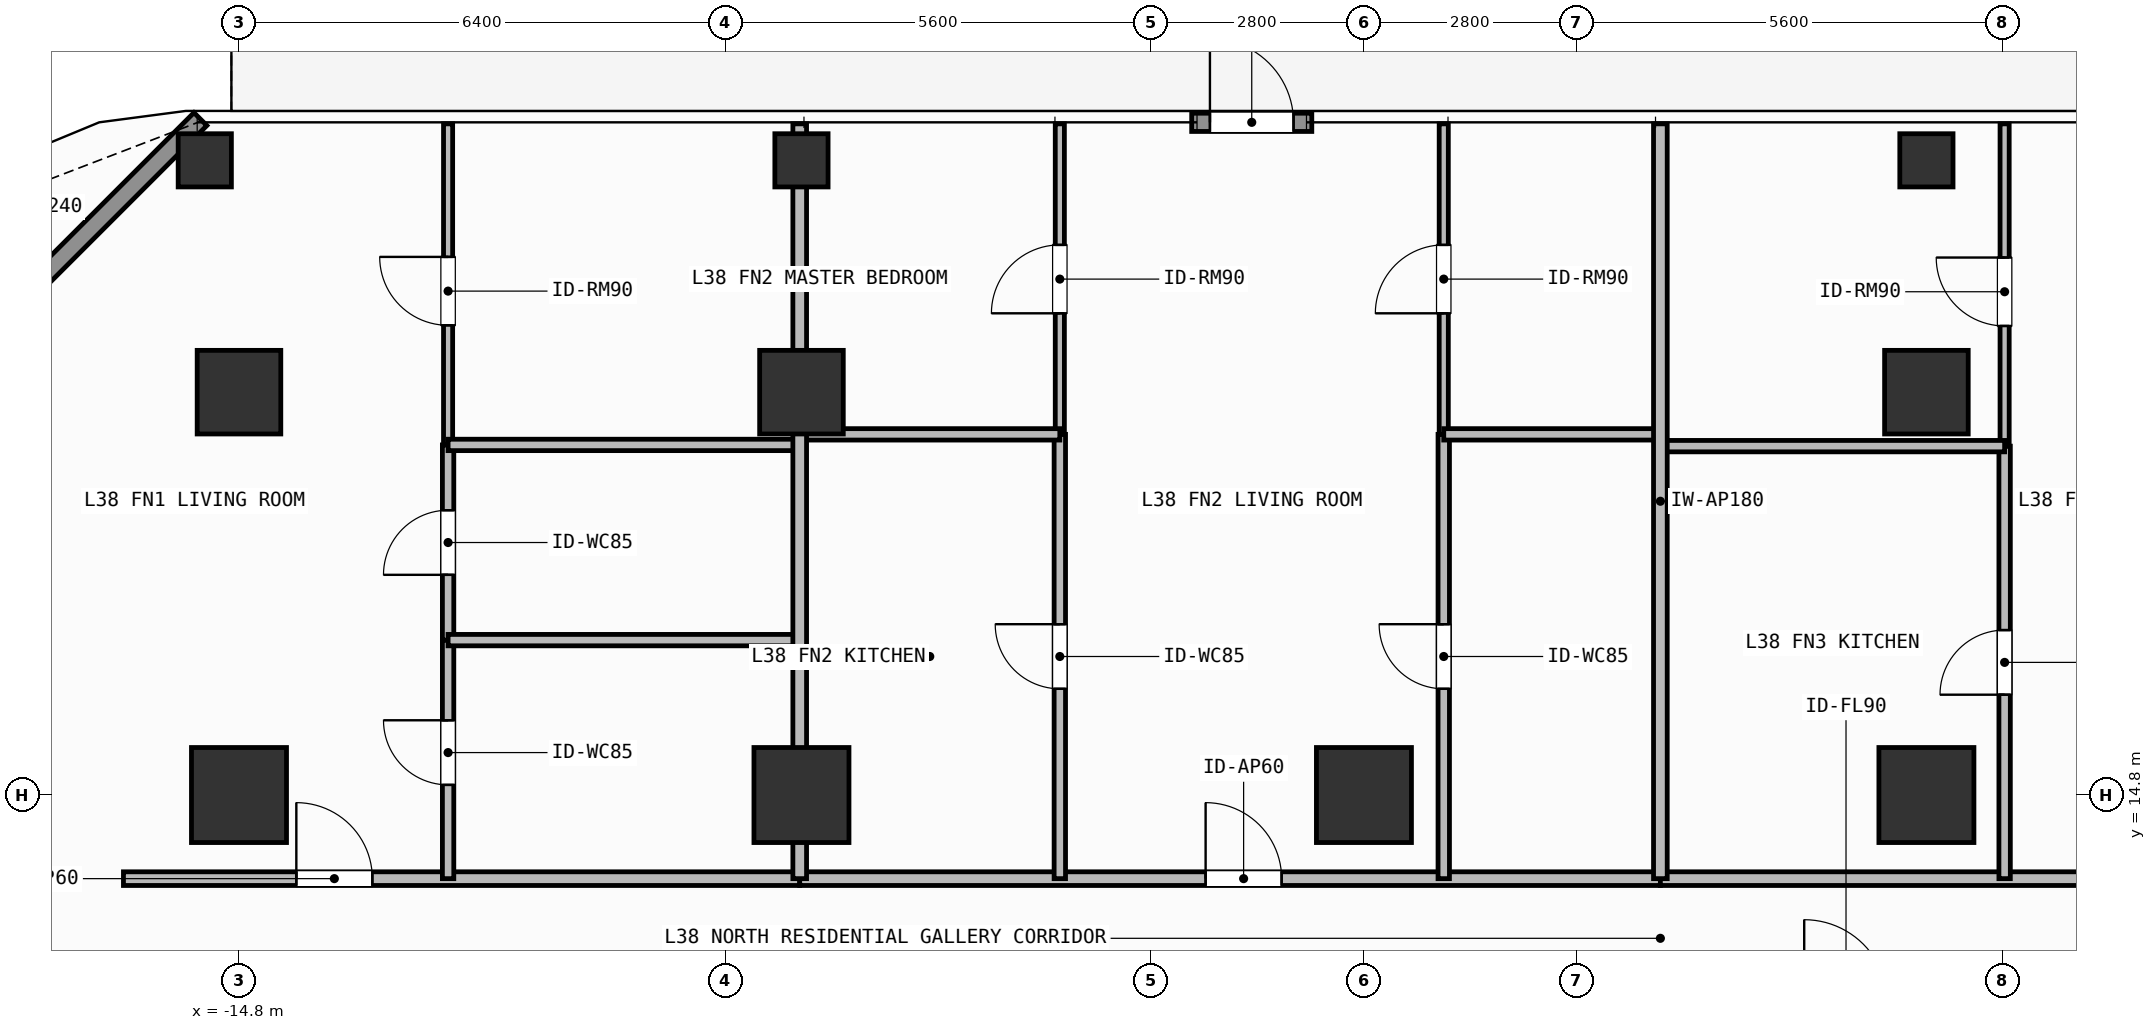
"""IFC4 building model, lengths in metres.
Left out: names, types, materials, properties, quantities, classifications, styles, units other than length and angle.
Written with IfcOpenShell. Run it as: python <this file> out.ifc"""

import sys

from ifc_helpers import new_model, si_unit, direction, frame, frame_2d, origin, origin_2d, place, context, subcontext, project, spatial, rectangle, hollow_rectangle, extrude, element, fill, save


model = new_model("IFC4")
c1 = context("Model", 3, precision=1e-05, world=origin(), true_north=direction((0.0, 1.0)))
c2 = subcontext(c1, "Body", "Model", "MODEL_VIEW")
j1 = project(units=[si_unit("LENGTHUNIT", "METRE"), si_unit("PLANEANGLEUNIT", "RADIAN")], contexts=[c1])
p1 = place(None, origin())
s1 = spatial("IfcSite", under=j1, at=p1, CompositionType="ELEMENT")
p2 = place(p1, origin())
s2 = spatial("IfcBuilding", under=s1, at=p2, CompositionType="ELEMENT")
p3 = place(p2, frame((0.0, 0.0, 152.4)))
s3 = spatial("IfcBuildingStorey", under=s2, at=p3, CompositionType="ELEMENT", Elevation=152.4)
for number, where, z_axis, x_axis in (
    (1, (-14.8, 14.8, 0.0), (0.0, 0.0, 1.0), (1.0, 0.0, 0.0)),
    (2, (-7.4, 14.8, 0.0), (0.0, 0.0, 1.0), (1.0, 0.0, 0.0)),
    (3, (0.0, 14.8, 0.0), (0.0, 0.0, 1.0), (1.0, 0.0, 0.0)),
    (4, (7.4, 14.8, 0.0), (0.0, 0.0, 1.0), (1.0, 0.0, 0.0)),
):
    element("IfcColumn", number, at=place(p3, frame(where, z_axis=z_axis, x_axis=x_axis)), inside=s3, PredefinedType="COLUMN", context=c2, shape_type="SweptSolid", body=[
        extrude(rectangle(XDim=1.25, YDim=1.25, at=origin_2d()), origin(), (0.0, 0.0, 1.0), 3.9),
    ])
for number, where, z_axis, x_axis in (
    (5, (-14.8, 20.1, 0.0), (0.0, 0.0, 1.0), (1.0, 0.0, 0.0)),
    (6, (-7.4, 20.1, 0.0), (0.0, 0.0, 1.0), (1.0, 0.0, 0.0)),
    (7, (7.4, 20.1, 0.0), (0.0, 0.0, 1.0), (1.0, 0.0, 0.0)),
):
    element("IfcColumn", number, at=place(p3, frame(where, z_axis=z_axis, x_axis=x_axis)), inside=s3, PredefinedType="COLUMN", context=c2, shape_type="SweptSolid", body=[
        extrude(rectangle(XDim=1.1, YDim=1.1, at=origin_2d()), origin(), (0.0, 0.0, 1.0), 3.9),
    ])
for number, where, z_axis, x_axis in (
    (8, (-15.25, 23.15, 0.0), (0.0, 0.0, 1.0), (1.0, 0.0, 0.0)),
    (9, (-7.4, 23.15, 0.0), (0.0, 0.0, 1.0), (1.0, 0.0, 0.0)),
    (10, (7.4, 23.15, 0.0), (0.0, 0.0, 1.0), (1.0, 0.0, 0.0)),
):
    element("IfcColumn", number, at=place(p3, frame(where, z_axis=z_axis, x_axis=x_axis)), inside=s3, PredefinedType="COLUMN", context=c2, shape_type="SweptSolid", body=[
        extrude(hollow_rectangle(XDim=0.7, YDim=0.7, WallThickness=0.032, at=origin_2d()), origin(), (0.0, 0.0, 1.0), 3.9),
    ])
p4 = place(p3, frame((-2.266, 23.65, 0.0), z_axis=(0.0, 0.0, 1.0), x_axis=(1.0, 0.0, 0.0)))
e11 = element("IfcWall", 11, at=p4, inside=s3, PredefinedType="SOLIDWALL", context=c2, shape_type="SweptSolid", body=[
    extrude(rectangle(XDim=1.58, YDim=0.24, at=frame_2d((0.79, 0.0))), origin(), (0.0, 0.0, 1.0), 3.6),
])
p5 = place(p4, frame((0.24, 0.0, 0.0)))
e12 = element("IfcOpeningElement", 12, at=p5, cuts=e11, PredefinedType="OPENING", context=c2, shape_type="SweptSolid", body=[
    extrude(rectangle(XDim=1.1, YDim=2.2, at=frame_2d((0.55, 1.1))), frame((0.0, 0.13, 0.0), z_axis=(0.0, -1.0, 0.0), x_axis=(1.0, 0.0, 0.0)), (0.0, 0.0, 1.0), 0.26),
])
p6 = place(p3, frame((-19.792, 19.208, 0.0), z_axis=(0.0, 0.0, 1.0), x_axis=(0.707106781187, 0.707106781187, 0.0)))
e13 = element("IfcWall", 13, at=p6, inside=s3, PredefinedType="SOLIDWALL", context=c2, shape_type="SweptSolid", body=[
    extrude(rectangle(XDim=6.343, YDim=0.24, at=frame_2d((3.171, 0.0))), origin(), (0.0, 0.0, 1.0), 3.6),
])
p7 = place(p3, frame((-16.32, 13.7, 0.0), z_axis=(0.0, 0.0, 1.0), x_axis=(1.0, 0.0, 0.0)))
e14 = element("IfcWall", 14, at=p7, inside=s3, PredefinedType="PARTITIONING", context=c2, shape_type="SweptSolid", body=[
    extrude(rectangle(XDim=8.897, YDim=0.18, at=frame_2d((4.448, 0.0))), origin(), (0.0, 0.0, 1.0), 3.6),
])
p8 = place(p7, frame((2.274, 0.0, 0.0)))
e15 = element("IfcOpeningElement", 15, at=p8, cuts=e14, PredefinedType="OPENING", context=c2, shape_type="SweptSolid", body=[
    extrude(rectangle(XDim=1.0, YDim=2.2, at=frame_2d((0.5, 1.1))), frame((0.0, 0.1, 0.0), z_axis=(0.0, -1.0, 0.0), x_axis=(1.0, 0.0, 0.0)), (0.0, 0.0, 1.0), 0.2),
])
p9 = place(p3, frame((-12.049, 13.7, 0.0), z_axis=(0.0, 0.0, 1.0), x_axis=(0.0, 1.0, 0.0)))
e16 = element("IfcWall", 16, at=p9, inside=s3, PredefinedType="PARTITIONING", context=c2, shape_type="SweptSolid", body=[
    extrude(rectangle(XDim=3.138, YDim=0.15, at=frame_2d((1.569, 0.0))), origin(), (0.0, 0.0, 1.0), 3.6),
])
p10 = place(p9, frame((1.233, 0.0, 0.0)))
e17 = element("IfcOpeningElement", 17, at=p10, cuts=e16, PredefinedType="OPENING", context=c2, shape_type="SweptSolid", body=[
    extrude(rectangle(XDim=0.85, YDim=2.1, at=frame_2d((0.425, 1.05))), frame((0.0, 0.085, 0.0), z_axis=(0.0, -1.0, 0.0), x_axis=(1.0, 0.0, 0.0)), (0.0, 0.0, 1.0), 0.17),
])
p11 = place(p3, frame((-12.049, 16.838, 0.0), z_axis=(0.0, 0.0, 1.0), x_axis=(0.0, 1.0, 0.0)))
e18 = element("IfcWall", 18, at=p11, inside=s3, PredefinedType="PARTITIONING", context=c2, shape_type="SweptSolid", body=[
    extrude(rectangle(XDim=2.568, YDim=0.15, at=frame_2d((1.284, 0.0))), origin(), (0.0, 0.0, 1.0), 3.6),
])
p12 = place(p11, frame((0.859, 0.0, 0.0)))
e19 = element("IfcOpeningElement", 19, at=p12, cuts=e18, PredefinedType="OPENING", context=c2, shape_type="SweptSolid", body=[
    extrude(rectangle(XDim=0.85, YDim=2.1, at=frame_2d((0.425, 1.05))), frame((0.0, 0.085, 0.0), z_axis=(0.0, -1.0, 0.0), x_axis=(1.0, 0.0, 0.0)), (0.0, 0.0, 1.0), 0.17),
])
p13 = place(p3, frame((-12.049, 19.406, 0.0), z_axis=(0.0, 0.0, 1.0), x_axis=(0.0, 1.0, 0.0)))
e20 = element("IfcWall", 20, at=p13, inside=s3, PredefinedType="PARTITIONING", context=c2, shape_type="SweptSolid", body=[
    extrude(rectangle(XDim=4.224, YDim=0.12, at=frame_2d((2.112, 0.0))), origin(), (0.0, 0.0, 1.0), 3.6),
])
p14 = place(p13, frame((1.573, 0.0, 0.0)))
e21 = element("IfcOpeningElement", 21, at=p14, cuts=e20, PredefinedType="OPENING", context=c2, shape_type="SweptSolid", body=[
    extrude(rectangle(XDim=0.9, YDim=2.1, at=frame_2d((0.45, 1.05))), frame((0.0, 0.07, 0.0), z_axis=(0.0, -1.0, 0.0), x_axis=(1.0, 0.0, 0.0)), (0.0, 0.0, 1.0), 0.14),
])
p15 = place(p3, frame((-7.423, 13.7, 0.0), z_axis=(0.0, 0.0, 1.0), x_axis=(1.0, 0.0, 0.0)))
e22 = element("IfcWall", 22, at=p15, inside=s3, PredefinedType="PARTITIONING", context=c2, shape_type="SweptSolid", body=[
    extrude(rectangle(XDim=11.323, YDim=0.18, at=frame_2d((5.662, 0.0))), origin(), (0.0, 0.0, 1.0), 3.6),
])
p16 = place(p15, frame((5.34, 0.0, 0.0)))
e23 = element("IfcOpeningElement", 23, at=p16, cuts=e22, PredefinedType="OPENING", context=c2, shape_type="SweptSolid", body=[
    extrude(rectangle(XDim=1.0, YDim=2.2, at=frame_2d((0.5, 1.1))), frame((0.0, 0.1, 0.0), z_axis=(0.0, -1.0, 0.0), x_axis=(1.0, 0.0, 0.0)), (0.0, 0.0, 1.0), 0.2),
])
p17 = place(p3, frame((-4.001, 13.7, 0.0), z_axis=(0.0, 0.0, 1.0), x_axis=(0.0, 1.0, 0.0)))
e24 = element("IfcWall", 24, at=p17, inside=s3, PredefinedType="PARTITIONING", context=c2, shape_type="SweptSolid", body=[
    extrude(rectangle(XDim=5.845, YDim=0.15, at=frame_2d((2.922, 0.0))), origin(), (0.0, 0.0, 1.0), 3.6),
])
p18 = place(p17, frame((2.498, 0.0, 0.0)))
e25 = element("IfcOpeningElement", 25, at=p18, cuts=e24, PredefinedType="OPENING", context=c2, shape_type="SweptSolid", body=[
    extrude(rectangle(XDim=0.85, YDim=2.1, at=frame_2d((0.425, 1.05))), frame((0.0, 0.085, 0.0), z_axis=(0.0, -1.0, 0.0), x_axis=(1.0, 0.0, 0.0)), (0.0, 0.0, 1.0), 0.17),
])
p19 = place(p3, frame((-4.001, 19.545, 0.0), z_axis=(0.0, 0.0, 1.0), x_axis=(0.0, 1.0, 0.0)))
e26 = element("IfcWall", 26, at=p19, inside=s3, PredefinedType="PARTITIONING", context=c2, shape_type="SweptSolid", body=[
    extrude(rectangle(XDim=4.085, YDim=0.12, at=frame_2d((2.042, 0.0))), origin(), (0.0, 0.0, 1.0), 3.6),
])
p20 = place(p19, frame((1.593, 0.0, 0.0)))
e27 = element("IfcOpeningElement", 27, at=p20, cuts=e26, PredefinedType="OPENING", context=c2, shape_type="SweptSolid", body=[
    extrude(rectangle(XDim=0.9, YDim=2.1, at=frame_2d((0.45, 1.05))), frame((0.0, 0.07, 0.0), z_axis=(0.0, -1.0, 0.0), x_axis=(1.0, 0.0, 0.0)), (0.0, 0.0, 1.0), 0.14),
])
p21 = place(p3, frame((1.05, 13.7, 0.0), z_axis=(0.0, 0.0, 1.0), x_axis=(0.0, 1.0, 0.0)))
e28 = element("IfcWall", 28, at=p21, inside=s3, PredefinedType="PARTITIONING", context=c2, shape_type="SweptSolid", body=[
    extrude(rectangle(XDim=5.845, YDim=0.15, at=frame_2d((2.922, 0.0))), origin(), (0.0, 0.0, 1.0), 3.6),
])
p22 = place(p21, frame((2.498, 0.0, 0.0)))
e29 = element("IfcOpeningElement", 29, at=p22, cuts=e28, PredefinedType="OPENING", context=c2, shape_type="SweptSolid", body=[
    extrude(rectangle(XDim=0.85, YDim=2.1, at=frame_2d((0.425, 1.05))), frame((0.0, 0.085, 0.0), z_axis=(0.0, -1.0, 0.0), x_axis=(1.0, 0.0, 0.0)), (0.0, 0.0, 1.0), 0.17),
])
p23 = place(p3, frame((1.05, 19.545, 0.0), z_axis=(0.0, 0.0, 1.0), x_axis=(0.0, 1.0, 0.0)))
e30 = element("IfcWall", 30, at=p23, inside=s3, PredefinedType="PARTITIONING", context=c2, shape_type="SweptSolid", body=[
    extrude(rectangle(XDim=4.085, YDim=0.12, at=frame_2d((2.042, 0.0))), origin(), (0.0, 0.0, 1.0), 3.6),
])
p24 = place(p23, frame((1.593, 0.0, 0.0)))
e31 = element("IfcOpeningElement", 31, at=p24, cuts=e30, PredefinedType="OPENING", context=c2, shape_type="SweptSolid", body=[
    extrude(rectangle(XDim=0.9, YDim=2.1, at=frame_2d((0.45, 1.05))), frame((0.0, 0.07, 0.0), z_axis=(0.0, -1.0, 0.0), x_axis=(1.0, 0.0, 0.0)), (0.0, 0.0, 1.0), 0.14),
])
p25 = place(p3, frame((3.9, 13.7, 0.0), z_axis=(0.0, 0.0, 1.0), x_axis=(1.0, 0.0, 0.0)))
e32 = element("IfcWall", 32, at=p25, inside=s3, PredefinedType="PARTITIONING", context=c2, shape_type="SweptSolid", body=[
    extrude(rectangle(XDim=11.323, YDim=0.18, at=frame_2d((5.662, 0.0))), origin(), (0.0, 0.0, 1.0), 3.6),
])
p26 = place(p25, frame((5.519, 0.0, 0.0)))
e33 = element("IfcOpeningElement", 33, at=p26, cuts=e32, PredefinedType="OPENING", context=c2, shape_type="SweptSolid", body=[
    extrude(rectangle(XDim=1.0, YDim=2.2, at=frame_2d((0.5, 1.1))), frame((0.0, 0.1, 0.0), z_axis=(0.0, -1.0, 0.0), x_axis=(1.0, 0.0, 0.0)), (0.0, 0.0, 1.0), 0.2),
])
p27 = place(p3, frame((8.429, 13.7, 0.0), z_axis=(0.0, 0.0, 1.0), x_axis=(0.0, 1.0, 0.0)))
e34 = element("IfcWall", 34, at=p27, inside=s3, PredefinedType="PARTITIONING", context=c2, shape_type="SweptSolid", body=[
    extrude(rectangle(XDim=5.69, YDim=0.15, at=frame_2d((2.845, 0.0))), origin(), (0.0, 0.0, 1.0), 3.6),
])
p28 = place(p27, frame((2.42, 0.0, 0.0)))
e35 = element("IfcOpeningElement", 35, at=p28, cuts=e34, PredefinedType="OPENING", context=c2, shape_type="SweptSolid", body=[
    extrude(rectangle(XDim=0.85, YDim=2.1, at=frame_2d((0.425, 1.05))), frame((0.0, 0.085, 0.0), z_axis=(0.0, -1.0, 0.0), x_axis=(1.0, 0.0, 0.0)), (0.0, 0.0, 1.0), 0.17),
])
p29 = place(p3, frame((8.429, 19.39, 0.0), z_axis=(0.0, 0.0, 1.0), x_axis=(0.0, 1.0, 0.0)))
e36 = element("IfcWall", 36, at=p29, inside=s3, PredefinedType="PARTITIONING", context=c2, shape_type="SweptSolid", body=[
    extrude(rectangle(XDim=4.24, YDim=0.12, at=frame_2d((2.12, 0.0))), origin(), (0.0, 0.0, 1.0), 3.6),
])
p30 = place(p29, frame((1.581, 0.0, 0.0)))
e37 = element("IfcOpeningElement", 37, at=p30, cuts=e36, PredefinedType="OPENING", context=c2, shape_type="SweptSolid", body=[
    extrude(rectangle(XDim=0.9, YDim=2.1, at=frame_2d((0.45, 1.05))), frame((0.0, 0.07, 0.0), z_axis=(0.0, -1.0, 0.0), x_axis=(1.0, 0.0, 0.0)), (0.0, 0.0, 1.0), 0.14),
])
for number, where, z_axis, x_axis in (
    (38, (-12.049, 16.838, 0.0), (0.0, 0.0, 1.0), (1.0, 0.0, 0.0)),
    (39, (-12.049, 19.406, 0.0), (0.0, 0.0, 1.0), (1.0, 0.0, 0.0)),
):
    element("IfcWall", number, at=place(p3, frame(where, z_axis=z_axis, x_axis=x_axis)), inside=s3, PredefinedType="PARTITIONING", context=c2, shape_type="SweptSolid", body=[
        extrude(rectangle(XDim=4.626, YDim=0.15, at=frame_2d((2.313, 0.0))), origin(), (0.0, 0.0, 1.0), 3.6),
    ])
p31 = place(p3, frame((-7.423, 19.545, 0.0), z_axis=(0.0, 0.0, 1.0), x_axis=(1.0, 0.0, 0.0)))
e40 = element("IfcWall", 40, at=p31, inside=s3, PredefinedType="PARTITIONING", context=c2, shape_type="SweptSolid", body=[
    extrude(rectangle(XDim=3.422, YDim=0.15, at=frame_2d((1.711, 0.0))), origin(), (0.0, 0.0, 1.0), 3.6),
])
p32 = place(p3, frame((1.05, 19.545, 0.0), z_axis=(0.0, 0.0, 1.0), x_axis=(1.0, 0.0, 0.0)))
e41 = element("IfcWall", 41, at=p32, inside=s3, PredefinedType="PARTITIONING", context=c2, shape_type="SweptSolid", body=[
    extrude(rectangle(XDim=2.85, YDim=0.15, at=frame_2d((1.425, 0.0))), origin(), (0.0, 0.0, 1.0), 3.6),
])
p33 = place(p3, frame((-7.423, 13.7, 0.0), z_axis=(0.0, 0.0, 1.0), x_axis=(0.0, 1.0, 0.0)))
e42 = element("IfcWall", 42, at=p33, inside=s3, PredefinedType="PARTITIONING", context=c2, shape_type="SweptSolid", body=[
    extrude(rectangle(XDim=9.93, YDim=0.18, at=frame_2d((4.965, 0.0))), origin(), (0.0, 0.0, 1.0), 3.002),
])
p34 = place(p3, frame((3.9, 19.39, 0.0), z_axis=(0.0, 0.0, 1.0), x_axis=(1.0, 0.0, 0.0)))
e43 = element("IfcWall", 43, at=p34, inside=s3, PredefinedType="PARTITIONING", context=c2, shape_type="SweptSolid", body=[
    extrude(rectangle(XDim=4.529, YDim=0.15, at=frame_2d((2.265, 0.0))), origin(), (0.0, 0.0, 1.0), 3.6),
])
p35 = place(p3, frame((3.9, 13.7, 0.0), z_axis=(0.0, 0.0, 1.0), x_axis=(0.0, 1.0, 0.0)))
e44 = element("IfcWall", 44, at=p35, inside=s3, PredefinedType="PARTITIONING", context=c2, shape_type="SweptSolid", body=[
    extrude(rectangle(XDim=9.93, YDim=0.18, at=frame_2d((4.965, 0.0))), origin(), (0.0, 0.0, 1.0), 3.6),
])
p36 = place(p5, origin())
e45 = element("IfcDoor", 45, at=p36, inside=s3, OperationType="SINGLE_SWING_LEFT", PredefinedType="DOOR", context=c2, shape_type="SweptSolid", body=[
    extrude(rectangle(XDim=1.1, YDim=2.2, at=frame_2d((0.55, 1.1))), frame((0.0, 0.025, 0.0), z_axis=(0.0, -1.0, 0.0), x_axis=(1.0, 0.0, 0.0)), (0.0, 0.0, 1.0), 0.05),
])
fill(e12, e45)
p37 = place(p8, origin())
e46 = element("IfcDoor", 46, at=p37, inside=s3, OperationType="SINGLE_SWING_LEFT", PredefinedType="DOOR", context=c2, shape_type="SweptSolid", body=[
    extrude(rectangle(XDim=1.0, YDim=2.2, at=frame_2d((0.5, 1.1))), frame((0.0, 0.025, 0.0), z_axis=(0.0, -1.0, 0.0), x_axis=(1.0, 0.0, 0.0)), (0.0, 0.0, 1.0), 0.05),
])
fill(e15, e46)
p38 = place(p10, origin())
e47 = element("IfcDoor", 47, at=p38, inside=s3, OperationType="SINGLE_SWING_RIGHT", PredefinedType="DOOR", context=c2, shape_type="SweptSolid", body=[
    extrude(rectangle(XDim=0.85, YDim=2.1, at=frame_2d((0.425, 1.05))), frame((0.0, 0.025, 0.0), z_axis=(0.0, -1.0, 0.0), x_axis=(1.0, 0.0, 0.0)), (0.0, 0.0, 1.0), 0.05),
])
fill(e17, e47)
p39 = place(p12, origin())
e48 = element("IfcDoor", 48, at=p39, inside=s3, OperationType="SINGLE_SWING_LEFT", PredefinedType="DOOR", context=c2, shape_type="SweptSolid", body=[
    extrude(rectangle(XDim=0.85, YDim=2.1, at=frame_2d((0.425, 1.05))), frame((0.0, 0.025, 0.0), z_axis=(0.0, -1.0, 0.0), x_axis=(1.0, 0.0, 0.0)), (0.0, 0.0, 1.0), 0.05),
])
fill(e19, e48)
p40 = place(p14, origin())
e49 = element("IfcDoor", 49, at=p40, inside=s3, OperationType="SINGLE_SWING_RIGHT", PredefinedType="DOOR", context=c2, shape_type="SweptSolid", body=[
    extrude(rectangle(XDim=0.9, YDim=2.1, at=frame_2d((0.45, 1.05))), frame((0.0, 0.025, 0.0), z_axis=(0.0, -1.0, 0.0), x_axis=(1.0, 0.0, 0.0)), (0.0, 0.0, 1.0), 0.05),
])
fill(e21, e49)
p41 = place(p16, origin())
e50 = element("IfcDoor", 50, at=p41, inside=s3, OperationType="SINGLE_SWING_LEFT", PredefinedType="DOOR", context=c2, shape_type="SweptSolid", body=[
    extrude(rectangle(XDim=1.0, YDim=2.2, at=frame_2d((0.5, 1.1))), frame((0.0, 0.025, 0.0), z_axis=(0.0, -1.0, 0.0), x_axis=(1.0, 0.0, 0.0)), (0.0, 0.0, 1.0), 0.05),
])
fill(e23, e50)
p42 = place(p18, origin())
e51 = element("IfcDoor", 51, at=p42, inside=s3, OperationType="SINGLE_SWING_RIGHT", PredefinedType="DOOR", context=c2, shape_type="SweptSolid", body=[
    extrude(rectangle(XDim=0.85, YDim=2.1, at=frame_2d((0.425, 1.05))), frame((0.0, 0.025, 0.0), z_axis=(0.0, -1.0, 0.0), x_axis=(1.0, 0.0, 0.0)), (0.0, 0.0, 1.0), 0.05),
])
fill(e25, e51)
p43 = place(p20, origin())
e52 = element("IfcDoor", 52, at=p43, inside=s3, OperationType="SINGLE_SWING_LEFT", PredefinedType="DOOR", context=c2, shape_type="SweptSolid", body=[
    extrude(rectangle(XDim=0.9, YDim=2.1, at=frame_2d((0.45, 1.05))), frame((0.0, 0.025, 0.0), z_axis=(0.0, -1.0, 0.0), x_axis=(1.0, 0.0, 0.0)), (0.0, 0.0, 1.0), 0.05),
])
fill(e27, e52)
p44 = place(p22, origin())
e53 = element("IfcDoor", 53, at=p44, inside=s3, OperationType="SINGLE_SWING_RIGHT", PredefinedType="DOOR", context=c2, shape_type="SweptSolid", body=[
    extrude(rectangle(XDim=0.85, YDim=2.1, at=frame_2d((0.425, 1.05))), frame((0.0, 0.025, 0.0), z_axis=(0.0, -1.0, 0.0), x_axis=(1.0, 0.0, 0.0)), (0.0, 0.0, 1.0), 0.05),
])
fill(e29, e53)
p45 = place(p24, origin())
e54 = element("IfcDoor", 54, at=p45, inside=s3, OperationType="SINGLE_SWING_LEFT", PredefinedType="DOOR", context=c2, shape_type="SweptSolid", body=[
    extrude(rectangle(XDim=0.9, YDim=2.1, at=frame_2d((0.45, 1.05))), frame((0.0, 0.025, 0.0), z_axis=(0.0, -1.0, 0.0), x_axis=(1.0, 0.0, 0.0)), (0.0, 0.0, 1.0), 0.05),
])
fill(e31, e54)
p46 = place(p28, origin())
e55 = element("IfcDoor", 55, at=p46, inside=s3, OperationType="SINGLE_SWING_LEFT", PredefinedType="DOOR", context=c2, shape_type="SweptSolid", body=[
    extrude(rectangle(XDim=0.85, YDim=2.1, at=frame_2d((0.425, 1.05))), frame((0.0, 0.025, 0.0), z_axis=(0.0, -1.0, 0.0), x_axis=(1.0, 0.0, 0.0)), (0.0, 0.0, 1.0), 0.05),
])
fill(e35, e55)
p47 = place(p30, origin())
e56 = element("IfcDoor", 56, at=p47, inside=s3, OperationType="SINGLE_SWING_RIGHT", PredefinedType="DOOR", context=c2, shape_type="SweptSolid", body=[
    extrude(rectangle(XDim=0.9, YDim=2.1, at=frame_2d((0.45, 1.05))), frame((0.0, 0.025, 0.0), z_axis=(0.0, -1.0, 0.0), x_axis=(1.0, 0.0, 0.0)), (0.0, 0.0, 1.0), 0.05),
])
fill(e37, e56)
save(model, sys.argv[1])
